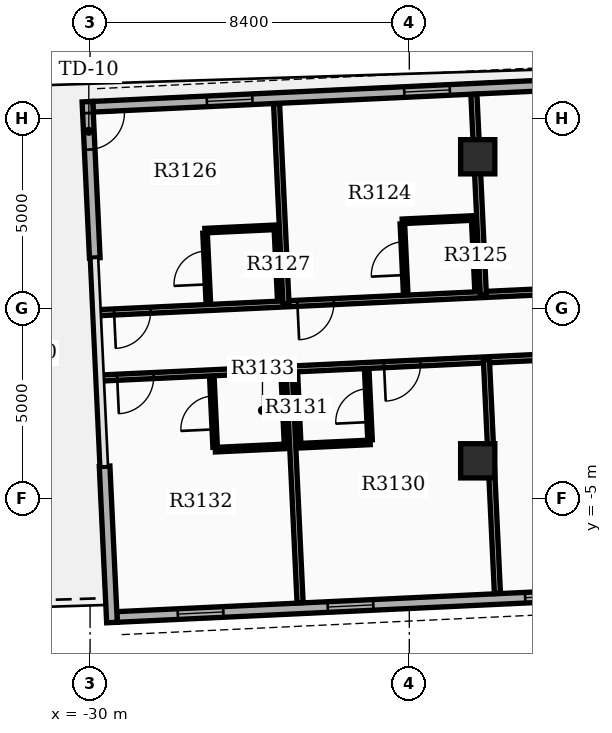
"""IFC4 building model, lengths in metres.
Left out: names, types, materials, properties, quantities, classifications, styles, units other than length and angle.
Written with IfcOpenShell. Run it as: python <this file> out.ifc"""

import sys

from ifc_helpers import new_model, si_unit, direction, frame, frame_2d, origin, origin_2d, place, context, subcontext, project, spatial, rectangle, extrude, element, fill, save


model = new_model("IFC4")
c1 = context("Model", 3, precision=1e-05, world=origin(), true_north=direction((0.0, 1.0)))
c2 = subcontext(c1, "Body", "Model", "MODEL_VIEW")
j1 = project(units=[si_unit("LENGTHUNIT", "METRE"), si_unit("PLANEANGLEUNIT", "RADIAN")], contexts=[c1])
p1 = place(None, origin())
s1 = spatial("IfcSite", under=j1, at=p1, CompositionType="ELEMENT")
p2 = place(p1, origin())
s2 = spatial("IfcBuilding", under=s1, at=p2, CompositionType="ELEMENT")
p3 = place(p2, frame((0.0, 0.0, 196.8)))
s3 = spatial("IfcBuildingStorey", under=s2, at=p3, CompositionType="ELEMENT", Elevation=196.8)
for number, where, z_axis, x_axis in (
    (1, (-19.8, -4.0, 0.0), (0.0, 0.0, 1.0), (1.0, 0.0, 0.0)),
    (2, (-19.8, 4.0, 0.0), (0.0, 0.0, 1.0), (1.0, 0.0, 0.0)),
):
    element("IfcColumn", number, at=place(p3, frame(where, z_axis=z_axis, x_axis=x_axis)), inside=s3, PredefinedType="COLUMN", context=c2, shape_type="SweptSolid", body=[
        extrude(rectangle(XDim=0.9, YDim=0.9, at=origin_2d()), origin(), (0.0, 0.0, 1.0), 4.5),
    ])
p4 = place(p3, frame((-15.24, 6.009, 0.0), z_axis=(0.0, 0.0, 1.0), x_axis=(-0.998890124275, -0.047101163748, 0.0)))
e3 = element("IfcWall", 3, at=p4, inside=s3, PredefinedType="STANDARD", context=c2, shape_type="SweptSolid", body=[
    extrude(rectangle(XDim=14.7, YDim=0.28, at=frame_2d((7.35, 0.0))), origin(), (0.0, 0.0, 1.0), 3.38),
])
p5 = place(p4, frame((1.6, 0.0, 0.8)))
e4 = element("IfcOpeningElement", 4, at=p5, cuts=e3, PredefinedType="OPENING", context=c2, shape_type="SweptSolid", body=[
    extrude(rectangle(XDim=1.2, YDim=1.6, at=frame_2d((0.6, 0.8))), frame((0.0, 0.15, 0.0), z_axis=(0.0, -1.0, 0.0), x_axis=(1.0, 0.0, 0.0)), (0.0, 0.0, 1.0), 0.3),
])
p6 = place(p4, frame((5.3, 0.0, 0.8)))
e5 = element("IfcOpeningElement", 5, at=p6, cuts=e3, PredefinedType="OPENING", context=c2, shape_type="SweptSolid", body=[
    extrude(rectangle(XDim=1.2, YDim=1.6, at=frame_2d((0.6, 0.8))), frame((0.0, 0.15, 0.0), z_axis=(0.0, -1.0, 0.0), x_axis=(1.0, 0.0, 0.0)), (0.0, 0.0, 1.0), 0.3),
])
p7 = place(p4, frame((10.5, 0.0, 0.8)))
e6 = element("IfcOpeningElement", 6, at=p7, cuts=e3, PredefinedType="OPENING", context=c2, shape_type="SweptSolid", body=[
    extrude(rectangle(XDim=1.2, YDim=1.6, at=frame_2d((0.6, 0.8))), frame((0.0, 0.15, 0.0), z_axis=(0.0, -1.0, 0.0), x_axis=(1.0, 0.0, 0.0)), (0.0, 0.0, 1.0), 0.3),
])
p8 = place(p3, frame((-29.291, -8.109, 0.0), z_axis=(0.0, 0.0, 1.0), x_axis=(0.998889342735, 0.047117735191, 0.0)))
e7 = element("IfcWall", 7, at=p8, inside=s3, PredefinedType="STANDARD", context=c2, shape_type="SweptSolid", body=[
    extrude(rectangle(XDim=14.7, YDim=0.28, at=frame_2d((7.35, 0.0))), origin(), (0.0, 0.0, 1.0), 3.38),
])
p9 = place(p8, frame((1.6, 0.0, 0.8)))
e8 = element("IfcOpeningElement", 8, at=p9, cuts=e7, PredefinedType="OPENING", context=c2, shape_type="SweptSolid", body=[
    extrude(rectangle(XDim=1.2, YDim=1.6, at=frame_2d((0.6, 0.8))), frame((0.0, 0.15, 0.0), z_axis=(0.0, -1.0, 0.0), x_axis=(1.0, 0.0, 0.0)), (0.0, 0.0, 1.0), 0.3),
])
p10 = place(p8, frame((5.55, 0.0, 0.8)))
e9 = element("IfcOpeningElement", 9, at=p10, cuts=e7, PredefinedType="OPENING", context=c2, shape_type="SweptSolid", body=[
    extrude(rectangle(XDim=1.2, YDim=1.6, at=frame_2d((0.6, 0.8))), frame((0.0, 0.15, 0.0), z_axis=(0.0, -1.0, 0.0), x_axis=(1.0, 0.0, 0.0)), (0.0, 0.0, 1.0), 0.3),
])
p11 = place(p8, frame((10.75, 0.0, 0.8)))
e10 = element("IfcOpeningElement", 10, at=p11, cuts=e7, PredefinedType="OPENING", context=c2, shape_type="SweptSolid", body=[
    extrude(rectangle(XDim=1.2, YDim=1.6, at=frame_2d((0.6, 0.8))), frame((0.0, 0.15, 0.0), z_axis=(0.0, -1.0, 0.0), x_axis=(1.0, 0.0, 0.0)), (0.0, 0.0, 1.0), 0.3),
])
p12 = place(p3, frame((-30.07, 5.45, 0.0), z_axis=(0.0, 0.0, 1.0), x_axis=(0.047094531617, -0.998890436981, 0.0)))
e11 = element("IfcWall", 11, at=p12, inside=s3, PredefinedType="STANDARD", context=c2, shape_type="SweptSolid", body=[
    extrude(rectangle(XDim=4.116, YDim=0.28, at=frame_2d((2.058, 0.0))), origin(), (0.0, 0.0, 1.0), 3.38),
])
p13 = place(p12, frame((0.3, 0.0, 0.0)))
e12 = element("IfcOpeningElement", 12, at=p13, cuts=e11, PredefinedType="OPENING", context=c2, shape_type="SweptSolid", body=[
    extrude(rectangle(XDim=0.96, YDim=2.1, at=frame_2d((0.48, 1.05))), frame((0.0, 0.15, 0.0), z_axis=(0.0, -1.0, 0.0), x_axis=(1.0, 0.0, 0.0)), (0.0, 0.0, 1.0), 0.3),
])
p14 = place(p3, frame((-29.618, -4.144, 0.0), z_axis=(0.0, 0.0, 1.0), x_axis=(0.047097322001, -0.998890305419, 0.0)))
e13 = element("IfcWall", 13, at=p14, inside=s3, PredefinedType="STANDARD", context=c2, shape_type="SweptSolid", body=[
    extrude(rectangle(XDim=4.116, YDim=0.28, at=frame_2d((2.058, 0.0))), origin(), (0.0, 0.0, 1.0), 3.38),
])
p15 = place(p3, frame((-14.895, 0.599, 0.0), z_axis=(0.0, 0.0, 1.0), x_axis=(-0.998889640632, -0.04711141941, 0.0)))
e14 = element("IfcWall", 14, at=p15, inside=s3, PredefinedType="PARTITIONING", context=c2, shape_type="SweptSolid", body=[
    extrude(rectangle(XDim=14.93, YDim=0.16, at=frame_2d((7.465, 0.0))), origin(), (0.0, 0.0, 1.0), 3.37),
])
p16 = place(p15, frame((2.456, 0.0, 0.0)))
e15 = element("IfcOpeningElement", 15, at=p16, cuts=e14, PredefinedType="OPENING", context=c2, shape_type="SweptSolid", body=[
    extrude(rectangle(XDim=0.96, YDim=2.15, at=frame_2d((0.48, 1.075))), frame((0.0, 0.09, 0.0), z_axis=(0.0, -1.0, 0.0), x_axis=(1.0, 0.0, 0.0)), (0.0, 0.0, 1.0), 0.18),
])
p17 = place(p15, frame((8.701, 0.0, 0.0)))
e16 = element("IfcOpeningElement", 16, at=p17, cuts=e14, PredefinedType="OPENING", context=c2, shape_type="SweptSolid", body=[
    extrude(rectangle(XDim=0.96, YDim=2.15, at=frame_2d((0.48, 1.075))), frame((0.0, 0.09, 0.0), z_axis=(0.0, -1.0, 0.0), x_axis=(1.0, 0.0, 0.0)), (0.0, 0.0, 1.0), 0.18),
])
p18 = place(p15, frame((13.53, 0.0, 0.0)))
e17 = element("IfcOpeningElement", 17, at=p18, cuts=e14, PredefinedType="OPENING", context=c2, shape_type="SweptSolid", body=[
    extrude(rectangle(XDim=0.96, YDim=2.15, at=frame_2d((0.48, 1.075))), frame((0.0, 0.09, 0.0), z_axis=(0.0, -1.0, 0.0), x_axis=(1.0, 0.0, 0.0)), (0.0, 0.0, 1.0), 0.18),
])
for number, where, z_axis, x_axis in (
    (18, (-19.653, 0.375, 0.0), (0.0, 0.0, 1.0), (-0.047, 0.999, 0.0)),
    (19, (-24.845, 0.13, 0.0), (0.0, 0.0, 1.0), (-0.047, 0.999, 0.0)),
):
    element("IfcWall", number, at=place(p3, frame(where, z_axis=z_axis, x_axis=x_axis)), inside=s3, PredefinedType="PARTITIONING", context=c2, shape_type="SweptSolid", body=[
        extrude(rectangle(XDim=5.272, YDim=0.16, at=frame_2d((2.636, 0.0))), origin(), (0.0, 0.0, 1.0), 3.37),
    ])
p19 = place(p3, frame((-21.697, 0.418, 0.0), z_axis=(0.0, 0.0, 1.0), x_axis=(-0.047087116047, 0.998890786574, 0.0)))
e20 = element("IfcWall", 20, at=p19, inside=s3, PredefinedType="PARTITIONING", context=c2, shape_type="SweptSolid", body=[
    extrude(rectangle(XDim=1.82, YDim=0.12, at=frame_2d((0.91, 0.0))), origin(), (0.0, 0.0, 1.0), 3.37),
])
p20 = place(p19, frame((0.47, 0.0, 0.0)))
e21 = element("IfcOpeningElement", 21, at=p20, cuts=e20, PredefinedType="OPENING", context=c2, shape_type="SweptSolid", body=[
    extrude(rectangle(XDim=0.88, YDim=2.1, at=frame_2d((0.44, 1.05))), frame((0.0, 0.07, 0.0), z_axis=(0.0, -1.0, 0.0), x_axis=(1.0, 0.0, 0.0)), (0.0, 0.0, 1.0), 0.14),
])
p21 = place(p3, frame((-19.819, 0.507, 0.0), z_axis=(0.0, 0.0, 1.0), x_axis=(-0.047087116047, 0.998890786574, 0.0)))
e22 = element("IfcWall", 22, at=p21, inside=s3, PredefinedType="PARTITIONING", context=c2, shape_type="SweptSolid", body=[
    extrude(rectangle(XDim=1.82, YDim=0.12, at=frame_2d((0.91, 0.0))), origin(), (0.0, 0.0, 1.0), 3.37),
])
p22 = place(p3, frame((-19.908, 2.39, 0.0), z_axis=(0.0, 0.0, 1.0), x_axis=(-0.998888319371, -0.047139425368, 0.0)))
e23 = element("IfcWall", 23, at=p22, inside=s3, PredefinedType="PARTITIONING", context=c2, shape_type="SweptSolid", body=[
    extrude(rectangle(XDim=1.88, YDim=0.12, at=frame_2d((0.94, 0.0))), origin(), (0.0, 0.0, 1.0), 3.37),
])
p23 = place(p3, frame((-26.889, 0.174, 0.0), z_axis=(0.0, 0.0, 1.0), x_axis=(-0.047220968666, 0.998884467853, 0.0)))
e24 = element("IfcWall", 24, at=p23, inside=s3, PredefinedType="PARTITIONING", context=c2, shape_type="SweptSolid", body=[
    extrude(rectangle(XDim=1.82, YDim=0.12, at=frame_2d((0.91, 0.0))), origin(), (0.0, 0.0, 1.0), 3.37),
])
p24 = place(p23, frame((0.47, 0.0, 0.0)))
e25 = element("IfcOpeningElement", 25, at=p24, cuts=e24, PredefinedType="OPENING", context=c2, shape_type="SweptSolid", body=[
    extrude(rectangle(XDim=0.88, YDim=2.1, at=frame_2d((0.44, 1.05))), frame((0.0, 0.07, 0.0), z_axis=(0.0, -1.0, 0.0), x_axis=(1.0, 0.0, 0.0)), (0.0, 0.0, 1.0), 0.14),
])
p25 = place(p3, frame((-25.011, 0.262, 0.0), z_axis=(0.0, 0.0, 1.0), x_axis=(-0.047087116047, 0.998890786574, 0.0)))
e26 = element("IfcWall", 26, at=p25, inside=s3, PredefinedType="PARTITIONING", context=c2, shape_type="SweptSolid", body=[
    extrude(rectangle(XDim=1.82, YDim=0.12, at=frame_2d((0.91, 0.0))), origin(), (0.0, 0.0, 1.0), 3.37),
])
p26 = place(p3, frame((-25.1, 2.145, 0.0), z_axis=(0.0, 0.0, 1.0), x_axis=(-0.998888319371, -0.047139425368, 0.0)))
e27 = element("IfcWall", 27, at=p26, inside=s3, PredefinedType="PARTITIONING", context=c2, shape_type="SweptSolid", body=[
    extrude(rectangle(XDim=1.88, YDim=0.12, at=frame_2d((0.94, 0.0))), origin(), (0.0, 0.0, 1.0), 3.37),
])
p27 = place(p3, frame((-14.814, -1.119, 0.0), z_axis=(0.0, 0.0, 1.0), x_axis=(-0.998889676925, -0.047110649891, 0.0)))
e28 = element("IfcWall", 28, at=p27, inside=s3, PredefinedType="PARTITIONING", context=c2, shape_type="SweptSolid", body=[
    extrude(rectangle(XDim=14.93, YDim=0.16, at=frame_2d((7.465, 0.0))), origin(), (0.0, 0.0, 1.0), 3.37),
])
p28 = place(p27, frame((2.456, 0.0, 0.0)))
e29 = element("IfcOpeningElement", 29, at=p28, cuts=e28, PredefinedType="OPENING", context=c2, shape_type="SweptSolid", body=[
    extrude(rectangle(XDim=0.96, YDim=2.15, at=frame_2d((0.48, 1.075))), frame((0.0, 0.09, 0.0), z_axis=(0.0, -1.0, 0.0), x_axis=(1.0, 0.0, 0.0)), (0.0, 0.0, 1.0), 0.18),
])
p29 = place(p27, frame((6.501, 0.0, 0.0)))
e30 = element("IfcOpeningElement", 30, at=p29, cuts=e28, PredefinedType="OPENING", context=c2, shape_type="SweptSolid", body=[
    extrude(rectangle(XDim=0.96, YDim=2.15, at=frame_2d((0.48, 1.075))), frame((0.0, 0.09, 0.0), z_axis=(0.0, -1.0, 0.0), x_axis=(1.0, 0.0, 0.0)), (0.0, 0.0, 1.0), 0.18),
])
p30 = place(p27, frame((13.53, 0.0, 0.0)))
e31 = element("IfcOpeningElement", 31, at=p30, cuts=e28, PredefinedType="OPENING", context=c2, shape_type="SweptSolid", body=[
    extrude(rectangle(XDim=0.96, YDim=2.15, at=frame_2d((0.48, 1.075))), frame((0.0, 0.09, 0.0), z_axis=(0.0, -1.0, 0.0), x_axis=(1.0, 0.0, 0.0)), (0.0, 0.0, 1.0), 0.18),
])
for number, where, z_axis, x_axis in (
    (32, (-19.571, -1.344, 0.0), (0.0, 0.0, 1.0), (0.047, -0.999, 0.0)),
    (33, (-24.764, -1.588, 0.0), (0.0, 0.0, 1.0), (0.047, -0.999, 0.0)),
):
    element("IfcWall", number, at=place(p3, frame(where, z_axis=z_axis, x_axis=x_axis)), inside=s3, PredefinedType="PARTITIONING", context=c2, shape_type="SweptSolid", body=[
        extrude(rectangle(XDim=6.152, YDim=0.16, at=frame_2d((3.076, 0.0))), origin(), (0.0, 0.0, 1.0), 3.37),
    ])
p31 = place(p3, frame((-22.634, -3.45, 0.0), z_axis=(0.0, 0.0, 1.0), x_axis=(-0.047087116047, 0.998890786574, 0.0)))
e34 = element("IfcWall", 34, at=p31, inside=s3, PredefinedType="PARTITIONING", context=c2, shape_type="SweptSolid", body=[
    extrude(rectangle(XDim=1.82, YDim=0.12, at=frame_2d((0.91, 0.0))), origin(), (0.0, 0.0, 1.0), 3.37),
])
p32 = place(p31, frame((0.47, 0.0, 0.0)))
e35 = element("IfcOpeningElement", 35, at=p32, cuts=e34, PredefinedType="OPENING", context=c2, shape_type="SweptSolid", body=[
    extrude(rectangle(XDim=0.88, YDim=2.1, at=frame_2d((0.44, 1.05))), frame((0.0, 0.07, 0.0), z_axis=(0.0, -1.0, 0.0), x_axis=(1.0, 0.0, 0.0)), (0.0, 0.0, 1.0), 0.14),
])
p33 = place(p3, frame((-24.511, -3.539, 0.0), z_axis=(0.0, 0.0, 1.0), x_axis=(-0.047220968666, 0.998884467853, 0.0)))
e36 = element("IfcWall", 36, at=p33, inside=s3, PredefinedType="PARTITIONING", context=c2, shape_type="SweptSolid", body=[
    extrude(rectangle(XDim=1.82, YDim=0.12, at=frame_2d((0.91, 0.0))), origin(), (0.0, 0.0, 1.0), 3.37),
])
p34 = place(p3, frame((-22.631, -3.515, 0.0), z_axis=(0.0, 0.0, 1.0), x_axis=(-0.998888319371, -0.047139425368, 0.0)))
e37 = element("IfcWall", 37, at=p34, inside=s3, PredefinedType="PARTITIONING", context=c2, shape_type="SweptSolid", body=[
    extrude(rectangle(XDim=1.88, YDim=0.12, at=frame_2d((0.94, 0.0))), origin(), (0.0, 0.0, 1.0), 3.37),
])
p35 = place(p3, frame((-26.709, -3.642, 0.0), z_axis=(0.0, 0.0, 1.0), x_axis=(-0.047220968666, 0.998884467853, 0.0)))
e38 = element("IfcWall", 38, at=p35, inside=s3, PredefinedType="PARTITIONING", context=c2, shape_type="SweptSolid", body=[
    extrude(rectangle(XDim=1.82, YDim=0.12, at=frame_2d((0.91, 0.0))), origin(), (0.0, 0.0, 1.0), 3.37),
])
p36 = place(p35, frame((0.47, 0.0, 0.0)))
e39 = element("IfcOpeningElement", 39, at=p36, cuts=e38, PredefinedType="OPENING", context=c2, shape_type="SweptSolid", body=[
    extrude(rectangle(XDim=0.88, YDim=2.1, at=frame_2d((0.44, 1.05))), frame((0.0, 0.07, 0.0), z_axis=(0.0, -1.0, 0.0), x_axis=(1.0, 0.0, 0.0)), (0.0, 0.0, 1.0), 0.14),
])
p37 = place(p3, frame((-24.831, -3.554, 0.0), z_axis=(0.0, 0.0, 1.0), x_axis=(-0.047080807099, 0.998891083954, 0.0)))
e40 = element("IfcWall", 40, at=p37, inside=s3, PredefinedType="PARTITIONING", context=c2, shape_type="SweptSolid", body=[
    extrude(rectangle(XDim=1.82, YDim=0.12, at=frame_2d((0.91, 0.0))), origin(), (0.0, 0.0, 1.0), 3.37),
])
p38 = place(p3, frame((-24.828, -3.619, 0.0), z_axis=(0.0, 0.0, 1.0), x_axis=(-0.998894425757, -0.04700985207, 0.0)))
e41 = element("IfcWall", 41, at=p38, inside=s3, PredefinedType="PARTITIONING", context=c2, shape_type="SweptSolid", body=[
    extrude(rectangle(XDim=1.88, YDim=0.12, at=frame_2d((0.94, 0.0))), origin(), (0.0, 0.0, 1.0), 3.37),
])
p39 = place(p6, origin())
e42 = element("IfcWindow", 42, at=p39, inside=s3, PartitioningType="SINGLE_PANEL", PredefinedType="WINDOW", context=c2, shape_type="SweptSolid", body=[
    extrude(rectangle(XDim=1.2, YDim=1.6, at=frame_2d((0.6, 0.8))), frame((0.0, 0.03, 0.0), z_axis=(0.0, -1.0, 0.0), x_axis=(1.0, 0.0, 0.0)), (0.0, 0.0, 1.0), 0.06),
])
fill(e5, e42)
p40 = place(p7, origin())
e43 = element("IfcWindow", 43, at=p40, inside=s3, PartitioningType="SINGLE_PANEL", PredefinedType="WINDOW", context=c2, shape_type="SweptSolid", body=[
    extrude(rectangle(XDim=1.2, YDim=1.6, at=frame_2d((0.6, 0.8))), frame((0.0, 0.03, 0.0), z_axis=(0.0, -1.0, 0.0), x_axis=(1.0, 0.0, 0.0)), (0.0, 0.0, 1.0), 0.06),
])
fill(e6, e43)
p41 = place(p9, origin())
e44 = element("IfcWindow", 44, at=p41, inside=s3, PartitioningType="SINGLE_PANEL", PredefinedType="WINDOW", context=c2, shape_type="SweptSolid", body=[
    extrude(rectangle(XDim=1.2, YDim=1.6, at=frame_2d((0.6, 0.8))), frame((0.0, 0.03, 0.0), z_axis=(0.0, -1.0, 0.0), x_axis=(1.0, 0.0, 0.0)), (0.0, 0.0, 1.0), 0.06),
])
fill(e8, e44)
p42 = place(p10, origin())
e45 = element("IfcWindow", 45, at=p42, inside=s3, PartitioningType="SINGLE_PANEL", PredefinedType="WINDOW", context=c2, shape_type="SweptSolid", body=[
    extrude(rectangle(XDim=1.2, YDim=1.6, at=frame_2d((0.6, 0.8))), frame((0.0, 0.03, 0.0), z_axis=(0.0, -1.0, 0.0), x_axis=(1.0, 0.0, 0.0)), (0.0, 0.0, 1.0), 0.06),
])
fill(e9, e45)
p43 = place(p11, origin())
e46 = element("IfcWindow", 46, at=p43, inside=s3, PartitioningType="SINGLE_PANEL", PredefinedType="WINDOW", context=c2, shape_type="SweptSolid", body=[
    extrude(rectangle(XDim=1.2, YDim=1.6, at=frame_2d((0.6, 0.8))), frame((0.0, 0.03, 0.0), z_axis=(0.0, -1.0, 0.0), x_axis=(1.0, 0.0, 0.0)), (0.0, 0.0, 1.0), 0.06),
])
fill(e10, e46)
p44 = place(p13, origin())
e47 = element("IfcDoor", 47, at=p44, inside=s3, OperationType="SINGLE_SWING_LEFT", PredefinedType="DOOR", context=c2, shape_type="SweptSolid", body=[
    extrude(rectangle(XDim=0.96, YDim=2.1, at=frame_2d((0.48, 1.05))), frame((0.0, 0.025, 0.0), z_axis=(0.0, -1.0, 0.0), x_axis=(1.0, 0.0, 0.0)), (0.0, 0.0, 1.0), 0.05),
])
fill(e12, e47)
p45 = place(p17, origin())
e48 = element("IfcDoor", 48, at=p45, inside=s3, OperationType="SINGLE_SWING_RIGHT", PredefinedType="DOOR", context=c2, shape_type="SweptSolid", body=[
    extrude(rectangle(XDim=0.96, YDim=2.15, at=frame_2d((0.48, 1.075))), frame((0.0, 0.025, 0.0), z_axis=(0.0, -1.0, 0.0), x_axis=(1.0, 0.0, 0.0)), (0.0, 0.0, 1.0), 0.05),
])
fill(e16, e48)
p46 = place(p20, origin())
e49 = element("IfcDoor", 49, at=p46, inside=s3, OperationType="SINGLE_SWING_LEFT", PredefinedType="DOOR", context=c2, shape_type="SweptSolid", body=[
    extrude(rectangle(XDim=0.88, YDim=2.1, at=frame_2d((0.44, 1.05))), frame((0.0, 0.025, 0.0), z_axis=(0.0, -1.0, 0.0), x_axis=(1.0, 0.0, 0.0)), (0.0, 0.0, 1.0), 0.05),
])
fill(e21, e49)
p47 = place(p18, origin())
e50 = element("IfcDoor", 50, at=p47, inside=s3, OperationType="SINGLE_SWING_RIGHT", PredefinedType="DOOR", context=c2, shape_type="SweptSolid", body=[
    extrude(rectangle(XDim=0.96, YDim=2.15, at=frame_2d((0.48, 1.075))), frame((0.0, 0.025, 0.0), z_axis=(0.0, -1.0, 0.0), x_axis=(1.0, 0.0, 0.0)), (0.0, 0.0, 1.0), 0.05),
])
fill(e17, e50)
p48 = place(p24, origin())
e51 = element("IfcDoor", 51, at=p48, inside=s3, OperationType="SINGLE_SWING_LEFT", PredefinedType="DOOR", context=c2, shape_type="SweptSolid", body=[
    extrude(rectangle(XDim=0.88, YDim=2.1, at=frame_2d((0.44, 1.05))), frame((0.0, 0.025, 0.0), z_axis=(0.0, -1.0, 0.0), x_axis=(1.0, 0.0, 0.0)), (0.0, 0.0, 1.0), 0.05),
])
fill(e25, e51)
p49 = place(p29, origin())
e52 = element("IfcDoor", 52, at=p49, inside=s3, OperationType="SINGLE_SWING_RIGHT", PredefinedType="DOOR", context=c2, shape_type="SweptSolid", body=[
    extrude(rectangle(XDim=0.96, YDim=2.15, at=frame_2d((0.48, 1.075))), frame((0.0, 0.025, 0.0), z_axis=(0.0, -1.0, 0.0), x_axis=(1.0, 0.0, 0.0)), (0.0, 0.0, 1.0), 0.05),
])
fill(e30, e52)
p50 = place(p32, origin())
e53 = element("IfcDoor", 53, at=p50, inside=s3, OperationType="SINGLE_SWING_LEFT", PredefinedType="DOOR", context=c2, shape_type="SweptSolid", body=[
    extrude(rectangle(XDim=0.88, YDim=2.1, at=frame_2d((0.44, 1.05))), frame((0.0, 0.025, 0.0), z_axis=(0.0, -1.0, 0.0), x_axis=(1.0, 0.0, 0.0)), (0.0, 0.0, 1.0), 0.05),
])
fill(e35, e53)
p51 = place(p30, origin())
e54 = element("IfcDoor", 54, at=p51, inside=s3, OperationType="SINGLE_SWING_RIGHT", PredefinedType="DOOR", context=c2, shape_type="SweptSolid", body=[
    extrude(rectangle(XDim=0.96, YDim=2.15, at=frame_2d((0.48, 1.075))), frame((0.0, 0.025, 0.0), z_axis=(0.0, -1.0, 0.0), x_axis=(1.0, 0.0, 0.0)), (0.0, 0.0, 1.0), 0.05),
])
fill(e31, e54)
p52 = place(p36, origin())
e55 = element("IfcDoor", 55, at=p52, inside=s3, OperationType="SINGLE_SWING_LEFT", PredefinedType="DOOR", context=c2, shape_type="SweptSolid", body=[
    extrude(rectangle(XDim=0.88, YDim=2.1, at=frame_2d((0.44, 1.05))), frame((0.0, 0.025, 0.0), z_axis=(0.0, -1.0, 0.0), x_axis=(1.0, 0.0, 0.0)), (0.0, 0.0, 1.0), 0.05),
])
fill(e39, e55)
save(model, sys.argv[1])
